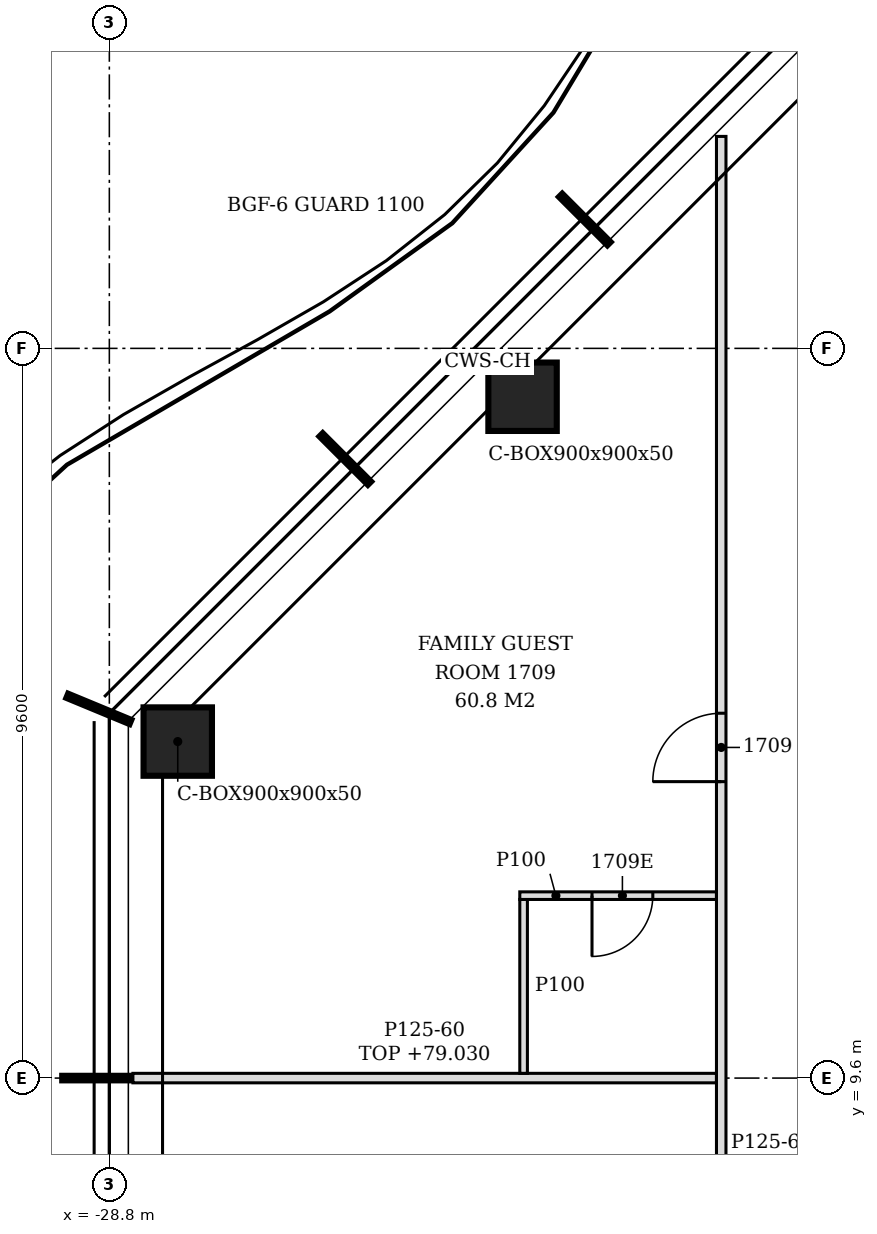
"""IFC4 building model, lengths in metres.
Left out: names, types, materials, properties, quantities, classifications, styles, units other than length and angle.
Written with IfcOpenShell. Run it as: python <this file> out.ifc"""

import sys

from ifc_helpers import new_model, si_unit, direction, frame, frame_2d, origin, origin_2d, place, context, subcontext, project, spatial, polyline, rectangle, hollow_rectangle, outline, extrude, element, fill, save


model = new_model("IFC4")
c1 = context("Model", 3, precision=1e-05, world=origin(), true_north=direction((0.0, 1.0)))
c2 = subcontext(c1, "Body", "Model", "MODEL_VIEW")
j1 = project(units=[si_unit("LENGTHUNIT", "METRE"), si_unit("PLANEANGLEUNIT", "RADIAN")], contexts=[c1])
p1 = place(None, origin())
s1 = spatial("IfcSite", under=j1, at=p1, CompositionType="ELEMENT")
p2 = place(p1, origin())
s2 = spatial("IfcBuilding", under=s1, at=p2, CompositionType="ELEMENT")
p3 = place(p2, frame((0.0, 0.0, 76.2)))
s3 = spatial("IfcBuildingStorey", under=s2, at=p3, CompositionType="ELEMENT", Elevation=76.2)
for number, where, z_axis, x_axis in (
    (1, (-23.364, 18.564, -0.15), (0.0, 0.0, 1.0), (1.0, 0.0, 0.0)),
    (2, (-27.9, 14.027, -0.15), (0.0, 0.0, 1.0), (1.0, 0.0, 0.0)),
):
    element("IfcColumn", number, at=place(p3, frame(where, z_axis=z_axis, x_axis=x_axis)), inside=s3, PredefinedType="COLUMN", context=c2, shape_type="SweptSolid", body=[
        extrude(hollow_rectangle(XDim=0.9, YDim=0.9, WallThickness=0.05, at=origin_2d()), origin(), (0.0, 0.0, 1.0), 3.6),
    ])
p4 = place(p3, frame((-20.75, -17.887, 0.0), z_axis=(0.0, 0.0, 1.0), x_axis=(0.0, 1.0, 0.0)))
e3 = element("IfcWall", 3, at=p4, inside=s3, PredefinedType="PARTITIONING", context=c2, shape_type="SweptSolid", body=[
    extrude(outline(polyline([(0.0, 0.0), (39.876, 0.0), (39.876, 3.45), (39.622, 3.45), (39.62, 2.63), (38.507, 2.63), (38.505, 3.45), (37.183, 3.45), (37.18, 2.98), (36.992, 2.98), (36.99, 3.45), (32.397, 3.45), (32.396, 2.83), (32.177, 2.83), (32.176, 3.45), (27.597, 3.45), (27.595, 2.83), (27.377, 2.83), (27.375, 3.45), (22.798, 3.45), (22.795, 2.83), (22.577, 2.83), (22.575, 3.45), (17.998, 3.45), (17.996, 2.83), (17.778, 2.83), (17.775, 3.45), (13.198, 3.45), (13.196, 2.83), (12.978, 2.83), (12.976, 3.45), (8.397, 3.45), (8.396, 2.83), (8.177, 2.83), (8.176, 3.45), (3.597, 3.45), (3.595, 2.83), (3.377, 2.83), (3.375, 3.45), (0.0, 3.45), (0.0, 0.0)])), frame((0.0, 0.062, 0.0), z_axis=(0.0, -1.0, 0.0), x_axis=(1.0, 0.0, 0.0)), (0.0, 0.0, 1.0), 0.125),
])
p5 = place(p4, frame((4.738, 0.0, 0.0)))
e4 = element("IfcOpeningElement", 4, at=p5, cuts=e3, PredefinedType="OPENING", context=c2, shape_type="SweptSolid", body=[
    extrude(rectangle(XDim=0.9, YDim=2.1, at=frame_2d((0.45, 1.05))), frame((0.0, 0.073, 0.0), z_axis=(0.0, -1.0, 0.0), x_axis=(1.0, 0.0, 0.0)), (0.0, 0.0, 1.0), 0.145),
])
p6 = place(p4, frame((13.387, 0.0, 0.0)))
e5 = element("IfcOpeningElement", 5, at=p6, cuts=e3, PredefinedType="OPENING", context=c2, shape_type="SweptSolid", body=[
    extrude(rectangle(XDim=0.9, YDim=2.1, at=frame_2d((0.45, 1.05))), frame((0.0, 0.073, 0.0), z_axis=(0.0, -1.0, 0.0), x_axis=(1.0, 0.0, 0.0)), (0.0, 0.0, 1.0), 0.145),
])
p7 = place(p4, frame((20.988, 0.0, 0.0)))
e6 = element("IfcOpeningElement", 6, at=p7, cuts=e3, PredefinedType="OPENING", context=c2, shape_type="SweptSolid", body=[
    extrude(rectangle(XDim=0.9, YDim=2.1, at=frame_2d((0.45, 1.05))), frame((0.0, 0.073, 0.0), z_axis=(0.0, -1.0, 0.0), x_axis=(1.0, 0.0, 0.0)), (0.0, 0.0, 1.0), 0.145),
])
p8 = place(p4, frame((31.387, 0.0, 0.0)))
e7 = element("IfcOpeningElement", 7, at=p8, cuts=e3, PredefinedType="OPENING", context=c2, shape_type="SweptSolid", body=[
    extrude(rectangle(XDim=0.9, YDim=2.1, at=frame_2d((0.45, 1.05))), frame((0.0, 0.073, 0.0), z_axis=(0.0, -1.0, 0.0), x_axis=(1.0, 0.0, 0.0)), (0.0, 0.0, 1.0), 0.145),
])
p9 = place(p3, frame((-28.49, 9.6, 0.0), z_axis=(0.0, 0.0, 1.0), x_axis=(1.0, 0.0, 0.0)))
e8 = element("IfcWall", 8, at=p9, inside=s3, PredefinedType="PARTITIONING", context=c2, shape_type="SweptSolid", body=[
    extrude(rectangle(XDim=7.677, YDim=0.125, at=frame_2d((3.839, 0.0))), origin(), (0.0, 0.0, 1.0), 2.83),
])
p10 = place(p3, frame((-23.35, 9.663, 0.0), z_axis=(0.0, 0.0, 1.0), x_axis=(0.0, 1.0, 0.0)))
e9 = element("IfcWall", 9, at=p10, inside=s3, PredefinedType="PARTITIONING", context=c2, shape_type="SweptSolid", body=[
    extrude(outline(polyline([(0.0, 0.0), (2.287, 0.0), (2.288, 3.45), (0.048, 3.45), (0.045, 2.83), (0.0, 2.83), (0.0, 0.0)])), frame((0.0, 0.05, 0.0), z_axis=(0.0, -1.0, 0.0), x_axis=(1.0, 0.0, 0.0)), (0.0, 0.0, 1.0), 0.1),
])
p11 = place(p3, frame((-23.4, 12.0, 0.0), z_axis=(0.0, 0.0, 1.0), x_axis=(1.0, 0.0, 0.0)))
e10 = element("IfcWall", 10, at=p11, inside=s3, PredefinedType="PARTITIONING", context=c2, shape_type="SweptSolid", body=[
    extrude(rectangle(XDim=2.587, YDim=0.1, at=frame_2d((1.294, 0.0))), origin(), (0.0, 0.0, 1.0), 3.45),
])
p12 = place(p11, frame((0.95, 0.0, 0.0)))
e11 = element("IfcOpeningElement", 11, at=p12, cuts=e10, PredefinedType="OPENING", context=c2, shape_type="SweptSolid", body=[
    extrude(rectangle(XDim=0.8, YDim=2.1, at=frame_2d((0.4, 1.05))), frame((0.0, 0.06, 0.0), z_axis=(0.0, -1.0, 0.0), x_axis=(1.0, 0.0, 0.0)), (0.0, 0.0, 1.0), 0.12),
])
p13 = place(p8, origin())
e12 = element("IfcDoor", 12, at=p13, inside=s3, OperationType="SINGLE_SWING_LEFT", PredefinedType="DOOR", context=c2, shape_type="SweptSolid", body=[
    extrude(rectangle(XDim=0.9, YDim=2.1, at=frame_2d((0.45, 1.05))), frame((0.0, 0.025, 0.0), z_axis=(0.0, -1.0, 0.0), x_axis=(1.0, 0.0, 0.0)), (0.0, 0.0, 1.0), 0.05),
])
fill(e7, e12)
p14 = place(p12, frame((0.8, 0.0, 0.0), z_axis=(0.0, 0.0, 1.0), x_axis=(-1.0, 0.0, 0.0)))
e13 = element("IfcDoor", 13, at=p14, inside=s3, OperationType="SINGLE_SWING_RIGHT", PredefinedType="DOOR", context=c2, shape_type="SweptSolid", body=[
    extrude(rectangle(XDim=0.8, YDim=2.1, at=frame_2d((0.4, 1.05))), frame((0.0, 0.025, 0.0), z_axis=(0.0, -1.0, 0.0), x_axis=(1.0, 0.0, 0.0)), (0.0, 0.0, 1.0), 0.05),
])
fill(e11, e13)
save(model, sys.argv[1])
